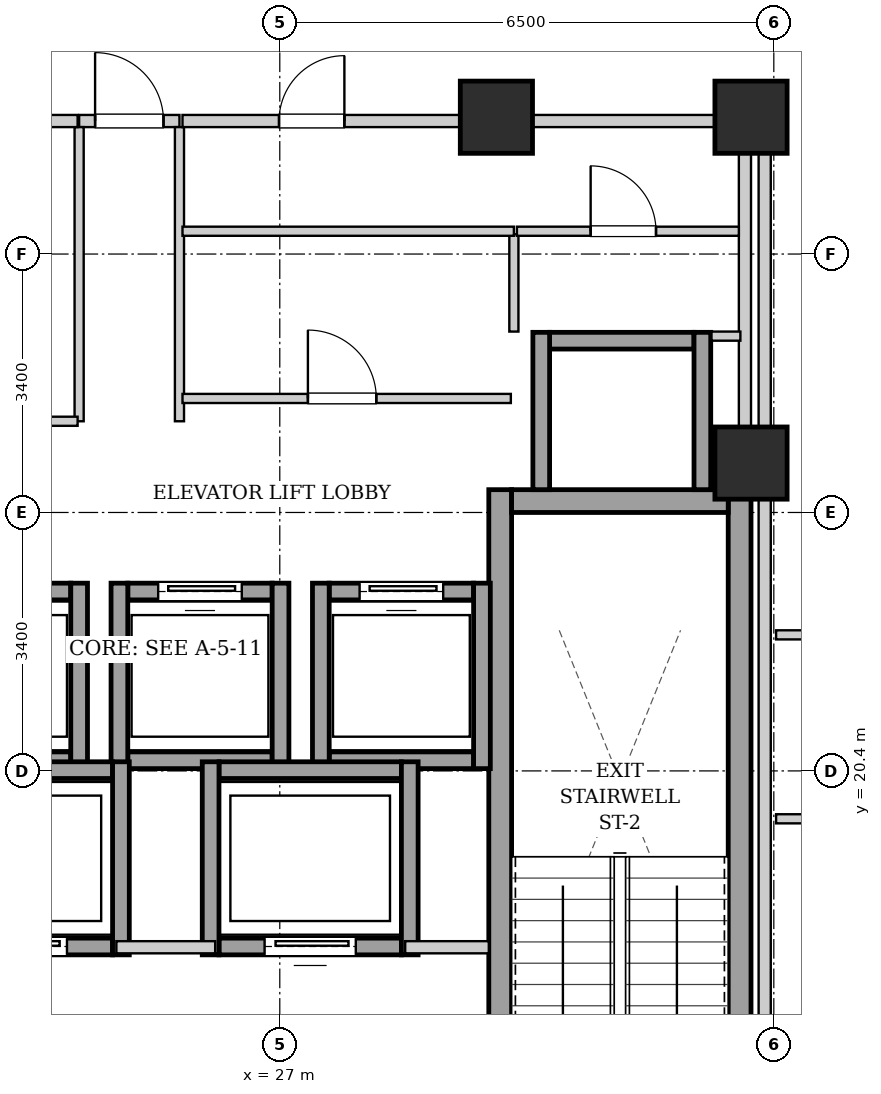
"""IFC4 building model, lengths in metres.
Left out: names, types, materials, properties, quantities, classifications, styles, units other than length and angle.
Written with IfcOpenShell. Run it as: python <this file> out.ifc"""

import sys

from ifc_helpers import new_model, si_unit, direction, frame, frame_2d, origin, origin_2d, place, context, subcontext, project, spatial, rectangle, extrude, element, fill, save


model = new_model("IFC4")
c1 = context("Model", 3, precision=1e-05, world=origin(), true_north=direction((0.0, 1.0)))
c2 = subcontext(c1, "Body", "Model", "MODEL_VIEW")
j1 = project(units=[si_unit("LENGTHUNIT", "METRE"), si_unit("PLANEANGLEUNIT", "RADIAN")], contexts=[c1])
p1 = place(None, origin())
s1 = spatial("IfcSite", under=j1, at=p1, CompositionType="ELEMENT")
p2 = place(p1, origin())
s2 = spatial("IfcBuilding", under=s1, at=p2, CompositionType="ELEMENT")
p3 = place(p2, frame((0.0, 0.0, 156.9)))
s3 = spatial("IfcBuildingStorey", under=s2, at=p3, CompositionType="ELEMENT", Elevation=156.9)
for number, where, z_axis, x_axis in (
    (1, (29.85, 29.0, 0.0), (0.0, 0.0, 1.0), (1.0, 0.0, 0.0)),
    (2, (33.2, 29.0, 0.0), (0.0, 0.0, 1.0), (1.0, 0.0, 0.0)),
    (3, (33.2, 24.45, 0.0), (0.0, 0.0, 1.0), (1.0, 0.0, 0.0)),
):
    element("IfcColumn", number, at=place(p3, frame(where, z_axis=z_axis, x_axis=x_axis)), inside=s3, PredefinedType="COLUMN", context=c2, shape_type="SweptSolid", body=[
        extrude(rectangle(XDim=0.95, YDim=0.95, at=origin_2d()), origin(), (0.0, 0.0, 1.0), 3.25),
    ])
for number, where, z_axis, x_axis in (
    (4, (29.9, 15.1, 0.0), (0.0, 0.0, 1.0), (0.0, 1.0, 0.0)),
    (5, (33.05, 15.1, 0.0), (0.0, 0.0, 1.0), (0.0, 1.0, 0.0)),
):
    element("IfcWall", number, at=place(p3, frame(where, z_axis=z_axis, x_axis=x_axis)), inside=s3, PredefinedType="SHEAR", context=c2, shape_type="SweptSolid", body=[
        extrude(rectangle(XDim=9.0, YDim=0.3, at=frame_2d((4.5, 0.0))), origin(), (0.0, 0.0, 1.0), 2.99),
    ])
p4 = place(p3, frame((30.05, 23.95, 0.0), z_axis=(0.0, 0.0, 1.0), x_axis=(1.0, 0.0, 0.0)))
e6 = element("IfcWall", 6, at=p4, inside=s3, PredefinedType="SHEAR", context=c2, shape_type="SweptSolid", body=[
    extrude(rectangle(XDim=2.85, YDim=0.3, at=frame_2d((1.425, 0.0))), origin(), (0.0, 0.0, 1.0), 2.99),
])
p5 = place(p3, frame((22.35, 20.54, 0.0), z_axis=(0.0, 0.0, 1.0), x_axis=(1.0, 0.0, 0.0)))
e7 = element("IfcWall", 7, at=p5, inside=s3, PredefinedType="SHEAR", context=c2, shape_type="SweptSolid", body=[
    extrude(rectangle(XDim=1.9, YDim=0.22, at=frame_2d((0.95, 0.0))), origin(), (0.0, 0.0, 1.0), 2.99),
])
p6 = place(p3, frame((22.35, 22.76, 0.0), z_axis=(0.0, 0.0, 1.0), x_axis=(1.0, 0.0, 0.0)))
e8 = element("IfcWall", 8, at=p6, inside=s3, PredefinedType="SHEAR", context=c2, shape_type="SweptSolid", body=[
    extrude(rectangle(XDim=1.9, YDim=0.22, at=frame_2d((0.95, 0.0))), origin(), (0.0, 0.0, 1.0), 2.99),
])
p7 = place(p6, frame((0.4, 0.0, 0.0)))
e9 = element("IfcOpeningElement", 9, at=p7, cuts=e8, PredefinedType="OPENING", context=c2, shape_type="SweptSolid", body=[
    extrude(rectangle(XDim=1.1, YDim=2.15, at=frame_2d((0.55, 1.075))), frame((0.0, 0.12, 0.0), z_axis=(0.0, -1.0, 0.0), x_axis=(1.0, 0.0, 0.0)), (0.0, 0.0, 1.0), 0.24),
])
p8 = place(p3, frame((24.36, 20.43, 0.0), z_axis=(0.0, 0.0, 1.0), x_axis=(0.0, 1.0, 0.0)))
e10 = element("IfcWall", 10, at=p8, inside=s3, PredefinedType="SHEAR", context=c2, shape_type="SweptSolid", body=[
    extrude(rectangle(XDim=2.44, YDim=0.22, at=frame_2d((1.22, 0.0))), origin(), (0.0, 0.0, 1.0), 2.99),
])
p9 = place(p3, frame((25.0, 20.54, 0.0), z_axis=(0.0, 0.0, 1.0), x_axis=(1.0, 0.0, 0.0)))
e11 = element("IfcWall", 11, at=p9, inside=s3, PredefinedType="SHEAR", context=c2, shape_type="SweptSolid", body=[
    extrude(rectangle(XDim=1.9, YDim=0.22, at=frame_2d((0.95, 0.0))), origin(), (0.0, 0.0, 1.0), 2.99),
])
p10 = place(p3, frame((25.0, 22.76, 0.0), z_axis=(0.0, 0.0, 1.0), x_axis=(1.0, 0.0, 0.0)))
e12 = element("IfcWall", 12, at=p10, inside=s3, PredefinedType="SHEAR", context=c2, shape_type="SweptSolid", body=[
    extrude(rectangle(XDim=1.9, YDim=0.22, at=frame_2d((0.95, 0.0))), origin(), (0.0, 0.0, 1.0), 2.99),
])
p11 = place(p10, frame((0.4, 0.0, 0.0)))
e13 = element("IfcOpeningElement", 13, at=p11, cuts=e12, PredefinedType="OPENING", context=c2, shape_type="SweptSolid", body=[
    extrude(rectangle(XDim=1.1, YDim=2.15, at=frame_2d((0.55, 1.075))), frame((0.0, 0.12, 0.0), z_axis=(0.0, -1.0, 0.0), x_axis=(1.0, 0.0, 0.0)), (0.0, 0.0, 1.0), 0.24),
])
for number, where, z_axis, x_axis in (
    (14, (24.89, 20.43, 0.0), (0.0, 0.0, 1.0), (0.0, 1.0, 0.0)),
    (15, (27.01, 20.43, 0.0), (0.0, 0.0, 1.0), (0.0, 1.0, 0.0)),
):
    element("IfcWall", number, at=place(p3, frame(where, z_axis=z_axis, x_axis=x_axis)), inside=s3, PredefinedType="SHEAR", context=c2, shape_type="SweptSolid", body=[
        extrude(rectangle(XDim=2.44, YDim=0.22, at=frame_2d((1.22, 0.0))), origin(), (0.0, 0.0, 1.0), 2.99),
    ])
p12 = place(p3, frame((27.65, 20.54, 0.0), z_axis=(0.0, 0.0, 1.0), x_axis=(1.0, 0.0, 0.0)))
e16 = element("IfcWall", 16, at=p12, inside=s3, PredefinedType="SHEAR", context=c2, shape_type="SweptSolid", body=[
    extrude(rectangle(XDim=1.9, YDim=0.22, at=frame_2d((0.95, 0.0))), origin(), (0.0, 0.0, 1.0), 2.99),
])
p13 = place(p3, frame((27.65, 22.76, 0.0), z_axis=(0.0, 0.0, 1.0), x_axis=(1.0, 0.0, 0.0)))
e17 = element("IfcWall", 17, at=p13, inside=s3, PredefinedType="SHEAR", context=c2, shape_type="SweptSolid", body=[
    extrude(rectangle(XDim=1.9, YDim=0.22, at=frame_2d((0.95, 0.0))), origin(), (0.0, 0.0, 1.0), 2.99),
])
p14 = place(p13, frame((0.4, 0.0, 0.0)))
e18 = element("IfcOpeningElement", 18, at=p14, cuts=e17, PredefinedType="OPENING", context=c2, shape_type="SweptSolid", body=[
    extrude(rectangle(XDim=1.1, YDim=2.15, at=frame_2d((0.55, 1.075))), frame((0.0, 0.12, 0.0), z_axis=(0.0, -1.0, 0.0), x_axis=(1.0, 0.0, 0.0)), (0.0, 0.0, 1.0), 0.24),
])
for number, where, z_axis, x_axis in (
    (19, (27.54, 20.43, 0.0), (0.0, 0.0, 1.0), (0.0, 1.0, 0.0)),
    (20, (29.66, 20.43, 0.0), (0.0, 0.0, 1.0), (0.0, 1.0, 0.0)),
):
    element("IfcWall", number, at=place(p3, frame(where, z_axis=z_axis, x_axis=x_axis)), inside=s3, PredefinedType="SHEAR", context=c2, shape_type="SweptSolid", body=[
        extrude(rectangle(XDim=2.44, YDim=0.22, at=frame_2d((1.22, 0.0))), origin(), (0.0, 0.0, 1.0), 2.99),
    ])
p15 = place(p3, frame((30.55, 26.06, 0.0), z_axis=(0.0, 0.0, 1.0), x_axis=(1.0, 0.0, 0.0)))
e21 = element("IfcWall", 21, at=p15, inside=s3, PredefinedType="SHEAR", context=c2, shape_type="SweptSolid", body=[
    extrude(rectangle(XDim=1.9, YDim=0.22, at=frame_2d((0.95, 0.0))), origin(), (0.0, 0.0, 1.0), 2.99),
])
for number, where, z_axis, x_axis in (
    (22, (30.44, 24.1, 0.0), (0.0, 0.0, 1.0), (0.0, 1.0, 0.0)),
    (23, (32.56, 24.1, 0.0), (0.0, 0.0, 1.0), (0.0, 1.0, 0.0)),
):
    element("IfcWall", number, at=place(p3, frame(where, z_axis=z_axis, x_axis=x_axis)), inside=s3, PredefinedType="SHEAR", context=c2, shape_type="SweptSolid", body=[
        extrude(rectangle(XDim=2.07, YDim=0.22, at=frame_2d((1.035, 0.0))), origin(), (0.0, 0.0, 1.0), 2.99),
    ])
p16 = place(p3, frame((22.4, 18.09, 0.0), z_axis=(0.0, 0.0, 1.0), x_axis=(1.0, 0.0, 0.0)))
e24 = element("IfcWall", 24, at=p16, inside=s3, PredefinedType="SHEAR", context=c2, shape_type="SweptSolid", body=[
    extrude(rectangle(XDim=2.4, YDim=0.22, at=frame_2d((1.2, 0.0))), origin(), (0.0, 0.0, 1.0), 2.99),
])
p17 = place(p16, frame((0.6, 0.0, 0.0)))
e25 = element("IfcOpeningElement", 25, at=p17, cuts=e24, PredefinedType="OPENING", context=c2, shape_type="SweptSolid", body=[
    extrude(rectangle(XDim=1.2, YDim=2.15, at=frame_2d((0.6, 1.075))), frame((0.0, 0.12, 0.0), z_axis=(0.0, -1.0, 0.0), x_axis=(1.0, 0.0, 0.0)), (0.0, 0.0, 1.0), 0.24),
])
p18 = place(p3, frame((22.4, 20.41, 0.0), z_axis=(0.0, 0.0, 1.0), x_axis=(1.0, 0.0, 0.0)))
e26 = element("IfcWall", 26, at=p18, inside=s3, PredefinedType="SHEAR", context=c2, shape_type="SweptSolid", body=[
    extrude(rectangle(XDim=2.4, YDim=0.22, at=frame_2d((1.2, 0.0))), origin(), (0.0, 0.0, 1.0), 2.99),
])
p19 = place(p3, frame((24.91, 17.98, 0.0), z_axis=(0.0, 0.0, 1.0), x_axis=(0.0, 1.0, 0.0)))
e27 = element("IfcWall", 27, at=p19, inside=s3, PredefinedType="SHEAR", context=c2, shape_type="SweptSolid", body=[
    extrude(rectangle(XDim=2.54, YDim=0.22, at=frame_2d((1.27, 0.0))), origin(), (0.0, 0.0, 1.0), 2.99),
])
p20 = place(p3, frame((26.2, 18.09, 0.0), z_axis=(0.0, 0.0, 1.0), x_axis=(1.0, 0.0, 0.0)))
e28 = element("IfcWall", 28, at=p20, inside=s3, PredefinedType="SHEAR", context=c2, shape_type="SweptSolid", body=[
    extrude(rectangle(XDim=2.4, YDim=0.22, at=frame_2d((1.2, 0.0))), origin(), (0.0, 0.0, 1.0), 2.99),
])
p21 = place(p20, frame((0.6, 0.0, 0.0)))
e29 = element("IfcOpeningElement", 29, at=p21, cuts=e28, PredefinedType="OPENING", context=c2, shape_type="SweptSolid", body=[
    extrude(rectangle(XDim=1.2, YDim=2.15, at=frame_2d((0.6, 1.075))), frame((0.0, 0.12, 0.0), z_axis=(0.0, -1.0, 0.0), x_axis=(1.0, 0.0, 0.0)), (0.0, 0.0, 1.0), 0.24),
])
p22 = place(p3, frame((26.2, 20.41, 0.0), z_axis=(0.0, 0.0, 1.0), x_axis=(1.0, 0.0, 0.0)))
e30 = element("IfcWall", 30, at=p22, inside=s3, PredefinedType="SHEAR", context=c2, shape_type="SweptSolid", body=[
    extrude(rectangle(XDim=2.4, YDim=0.22, at=frame_2d((1.2, 0.0))), origin(), (0.0, 0.0, 1.0), 2.99),
])
for number, where, z_axis, x_axis in (
    (31, (26.09, 17.98, 0.0), (0.0, 0.0, 1.0), (0.0, 1.0, 0.0)),
    (32, (28.71, 17.98, 0.0), (0.0, 0.0, 1.0), (0.0, 1.0, 0.0)),
):
    element("IfcWall", number, at=place(p3, frame(where, z_axis=z_axis, x_axis=x_axis)), inside=s3, PredefinedType="SHEAR", context=c2, shape_type="SweptSolid", body=[
        extrude(rectangle(XDim=2.54, YDim=0.22, at=frame_2d((1.27, 0.0))), origin(), (0.0, 0.0, 1.0), 2.99),
    ])
p23 = place(p3, frame((24.85, 18.08, 0.0), z_axis=(0.0, 0.0, 1.0), x_axis=(1.0, 0.0, 0.0)))
e33 = element("IfcWall", 33, at=p23, inside=s3, PredefinedType="PARTITIONING", context=c2, shape_type="SweptSolid", body=[
    extrude(rectangle(XDim=1.3, YDim=0.16, at=frame_2d((0.65, 0.0))), origin(), (0.0, 0.0, 1.0), 2.99),
])
p24 = place(p3, frame((28.65, 18.08, 0.0), z_axis=(0.0, 0.0, 1.0), x_axis=(1.0, 0.0, 0.0)))
e34 = element("IfcWall", 34, at=p24, inside=s3, PredefinedType="PARTITIONING", context=c2, shape_type="SweptSolid", body=[
    extrude(rectangle(XDim=1.1, YDim=0.16, at=frame_2d((0.55, 0.0))), origin(), (0.0, 0.0, 1.0), 2.99),
])
p25 = place(p3, frame((33.12, 24.12, 0.0), z_axis=(0.0, 0.0, 1.0), x_axis=(0.0, 1.0, 0.0)))
e35 = element("IfcWall", 35, at=p25, inside=s3, PredefinedType="PARTITIONING", context=c2, shape_type="SweptSolid", body=[
    extrude(rectangle(XDim=4.76, YDim=0.16, at=frame_2d((2.38, 0.0))), origin(), (0.0, 0.0, 1.0), 2.325),
])
p26 = place(p3, frame((24.36, 28.95, 0.0), z_axis=(0.0, 0.0, 1.0), x_axis=(1.0, 0.0, 0.0)))
e36 = element("IfcWall", 36, at=p26, inside=s3, PredefinedType="PARTITIONING", context=c2, shape_type="SweptSolid", body=[
    extrude(rectangle(XDim=1.32, YDim=0.16, at=frame_2d((0.66, 0.0))), origin(), (0.0, 0.0, 1.0), 2.442),
])
p27 = place(p26, frame((0.21, 0.0, 0.0)))
e37 = element("IfcOpeningElement", 37, at=p27, cuts=e36, PredefinedType="OPENING", context=c2, shape_type="SweptSolid", body=[
    extrude(rectangle(XDim=0.9, YDim=2.05, at=frame_2d((0.45, 1.025))), frame((0.0, 0.09, 0.0), z_axis=(0.0, -1.0, 0.0), x_axis=(1.0, 0.0, 0.0)), (0.0, 0.0, 1.0), 0.18),
])
for number, where, z_axis, x_axis in (
    (38, (24.36, 25.0, 0.0), (0.0, 0.0, 1.0), (0.0, 1.0, 0.0)),
    (39, (25.68, 25.0, 0.0), (0.0, 0.0, 1.0), (0.0, 1.0, 0.0)),
):
    element("IfcWall", number, at=place(p3, frame(where, z_axis=z_axis, x_axis=x_axis)), inside=s3, PredefinedType="PARTITIONING", context=c2, shape_type="SweptSolid", body=[
        extrude(rectangle(XDim=3.87, YDim=0.12, at=frame_2d((1.935, 0.0))), origin(), (0.0, 0.0, 1.0), 2.99),
    ])
p28 = place(p3, frame((30.08, 26.18, 0.0), z_axis=(0.0, 0.0, 1.0), x_axis=(0.0, 1.0, 0.0)))
e40 = element("IfcWall", 40, at=p28, inside=s3, PredefinedType="PARTITIONING", context=c2, shape_type="SweptSolid", body=[
    extrude(rectangle(XDim=1.28, YDim=0.12, at=frame_2d((0.64, 0.0))), origin(), (0.0, 0.0, 1.0), 2.99),
])
p29 = place(p3, frame((32.68, 26.12, 0.0), z_axis=(0.0, 0.0, 1.0), x_axis=(1.0, 0.0, 0.0)))
e41 = element("IfcWall", 41, at=p29, inside=s3, PredefinedType="PARTITIONING", context=c2, shape_type="SweptSolid", body=[
    extrude(rectangle(XDim=0.38, YDim=0.12, at=frame_2d((0.19, 0.0))), origin(), (0.0, 0.0, 1.0), 2.99),
])
p30 = place(p3, frame((30.12, 27.5, 0.0), z_axis=(0.0, 0.0, 1.0), x_axis=(1.0, 0.0, 0.0)))
e42 = element("IfcWall", 42, at=p30, inside=s3, PredefinedType="PARTITIONING", context=c2, shape_type="SweptSolid", body=[
    extrude(rectangle(XDim=2.92, YDim=0.12, at=frame_2d((1.46, 0.0))), origin(), (0.0, 0.0, 1.0), 2.99),
])
p31 = place(p30, frame((0.97, 0.0, 0.0)))
e43 = element("IfcOpeningElement", 43, at=p31, cuts=e42, PredefinedType="OPENING", context=c2, shape_type="SweptSolid", body=[
    extrude(rectangle(XDim=0.86, YDim=2.05, at=frame_2d((0.43, 1.025))), frame((0.0, 0.07, 0.0), z_axis=(0.0, -1.0, 0.0), x_axis=(1.0, 0.0, 0.0)), (0.0, 0.0, 1.0), 0.14),
])
p32 = place(p3, frame((22.3, 25.0, 0.0), z_axis=(0.0, 0.0, 1.0), x_axis=(1.0, 0.0, 0.0)))
e44 = element("IfcWall", 44, at=p32, inside=s3, PredefinedType="PARTITIONING", context=c2, shape_type="SweptSolid", body=[
    extrude(rectangle(XDim=2.04, YDim=0.12, at=frame_2d((1.02, 0.0))), origin(), (0.0, 0.0, 1.0), 2.99),
])
p33 = place(p3, frame((22.28, 28.95, 0.0), z_axis=(0.0, 0.0, 1.0), x_axis=(1.0, 0.0, 0.0)))
e45 = element("IfcWall", 45, at=p33, inside=s3, PredefinedType="PARTITIONING", context=c2, shape_type="SweptSolid", body=[
    extrude(rectangle(XDim=2.06, YDim=0.16, at=frame_2d((1.03, 0.0))), origin(), (0.0, 0.0, 1.0), 2.442),
])
p34 = place(p33, frame((0.62, 0.0, 0.0)))
e46 = element("IfcOpeningElement", 46, at=p34, cuts=e45, PredefinedType="OPENING", context=c2, shape_type="SweptSolid", body=[
    extrude(rectangle(XDim=0.86, YDim=2.05, at=frame_2d((0.43, 1.025))), frame((0.0, 0.09, 0.0), z_axis=(0.0, -1.0, 0.0), x_axis=(1.0, 0.0, 0.0)), (0.0, 0.0, 1.0), 0.18),
])
p35 = place(p3, frame((25.72, 27.5, 0.0), z_axis=(0.0, 0.0, 1.0), x_axis=(1.0, 0.0, 0.0)))
e47 = element("IfcWall", 47, at=p35, inside=s3, PredefinedType="PARTITIONING", context=c2, shape_type="SweptSolid", body=[
    extrude(rectangle(XDim=4.36, YDim=0.12, at=frame_2d((2.18, 0.0))), origin(), (0.0, 0.0, 1.0), 2.99),
])
p36 = place(p3, frame((25.72, 25.3, 0.0), z_axis=(0.0, 0.0, 1.0), x_axis=(1.0, 0.0, 0.0)))
e48 = element("IfcWall", 48, at=p36, inside=s3, PredefinedType="PARTITIONING", context=c2, shape_type="SweptSolid", body=[
    extrude(rectangle(XDim=4.32, YDim=0.12, at=frame_2d((2.16, 0.0))), origin(), (0.0, 0.0, 1.0), 2.99),
])
p37 = place(p36, frame((1.65, 0.0, 0.0)))
e49 = element("IfcOpeningElement", 49, at=p37, cuts=e48, PredefinedType="OPENING", context=c2, shape_type="SweptSolid", body=[
    extrude(rectangle(XDim=0.9, YDim=2.05, at=frame_2d((0.45, 1.025))), frame((0.0, 0.07, 0.0), z_axis=(0.0, -1.0, 0.0), x_axis=(1.0, 0.0, 0.0)), (0.0, 0.0, 1.0), 0.14),
])
p38 = place(p3, frame((25.72, 28.95, 0.0), z_axis=(0.0, 0.0, 1.0), x_axis=(1.0, 0.0, 0.0)))
e50 = element("IfcWall", 50, at=p38, inside=s3, PredefinedType="PARTITIONING", context=c2, shape_type="SweptSolid", body=[
    extrude(rectangle(XDim=7.32, YDim=0.16, at=frame_2d((3.66, 0.0))), origin(), (0.0, 0.0, 1.0), 2.442),
])
p39 = place(p38, frame((1.27, 0.0, 0.0)))
e51 = element("IfcOpeningElement", 51, at=p39, cuts=e50, PredefinedType="OPENING", context=c2, shape_type="SweptSolid", body=[
    extrude(rectangle(XDim=0.86, YDim=2.05, at=frame_2d((0.43, 1.025))), frame((0.0, 0.09, 0.0), z_axis=(0.0, -1.0, 0.0), x_axis=(1.0, 0.0, 0.0)), (0.0, 0.0, 1.0), 0.18),
])
p40 = place(p3, frame((33.53, 22.19, 0.0), z_axis=(0.0, 0.0, 1.0), x_axis=(1.0, 0.0, 0.0)))
e52 = element("IfcWall", 52, at=p40, inside=s3, PredefinedType="PARTITIONING", context=c2, shape_type="SweptSolid", body=[
    extrude(rectangle(XDim=2.45, YDim=0.12, at=frame_2d((1.225, 0.0))), origin(), (0.0, 0.0, 1.0), 2.99),
])
p41 = place(p3, frame((33.53, 19.77, 0.0), z_axis=(0.0, 0.0, 1.0), x_axis=(1.0, 0.0, 0.0)))
e53 = element("IfcWall", 53, at=p41, inside=s3, PredefinedType="PARTITIONING", context=c2, shape_type="SweptSolid", body=[
    extrude(rectangle(XDim=2.45, YDim=0.12, at=frame_2d((1.225, 0.0))), origin(), (0.0, 0.0, 1.0), 2.99),
])
p42 = place(p41, frame((0.795, 0.0, 0.0)))
e54 = element("IfcOpeningElement", 54, at=p42, cuts=e53, PredefinedType="OPENING", context=c2, shape_type="SweptSolid", body=[
    extrude(rectangle(XDim=0.86, YDim=2.05, at=frame_2d((0.43, 1.025))), frame((0.0, 0.07, 0.0), z_axis=(0.0, -1.0, 0.0), x_axis=(1.0, 0.0, 0.0)), (0.0, 0.0, 1.0), 0.14),
])
p43 = place(p3, frame((33.38, 15.02, 0.0), z_axis=(0.0, 0.0, 1.0), x_axis=(0.0, 1.0, 0.0)))
e55 = element("IfcWall", 55, at=p43, inside=s3, PredefinedType="PARTITIONING", context=c2, shape_type="SweptSolid", body=[
    extrude(rectangle(XDim=13.98, YDim=0.16, at=frame_2d((6.99, 0.0))), origin(), (0.0, 0.0, 1.0), 2.325),
])
p44 = place(p11, origin())
e56 = element("IfcDoor", 56, at=p44, inside=s3, OperationType="SLIDING_TO_LEFT", PredefinedType="DOOR", context=c2, shape_type="SweptSolid", body=[
    extrude(rectangle(XDim=1.1, YDim=2.15, at=frame_2d((0.55, 1.075))), frame((0.0, 0.025, 0.0), z_axis=(0.0, -1.0, 0.0), x_axis=(1.0, 0.0, 0.0)), (0.0, 0.0, 1.0), 0.05),
])
fill(e13, e56)
p45 = place(p14, origin())
e57 = element("IfcDoor", 57, at=p45, inside=s3, OperationType="SLIDING_TO_LEFT", PredefinedType="DOOR", context=c2, shape_type="SweptSolid", body=[
    extrude(rectangle(XDim=1.1, YDim=2.15, at=frame_2d((0.55, 1.075))), frame((0.0, 0.025, 0.0), z_axis=(0.0, -1.0, 0.0), x_axis=(1.0, 0.0, 0.0)), (0.0, 0.0, 1.0), 0.05),
])
fill(e18, e57)
p46 = place(p17, origin())
e58 = element("IfcDoor", 58, at=p46, inside=s3, OperationType="SLIDING_TO_LEFT", PredefinedType="DOOR", context=c2, shape_type="SweptSolid", body=[
    extrude(rectangle(XDim=1.2, YDim=2.15, at=frame_2d((0.6, 1.075))), frame((0.0, 0.025, 0.0), z_axis=(0.0, -1.0, 0.0), x_axis=(1.0, 0.0, 0.0)), (0.0, 0.0, 1.0), 0.05),
])
fill(e25, e58)
p47 = place(p21, origin())
e59 = element("IfcDoor", 59, at=p47, inside=s3, OperationType="SLIDING_TO_LEFT", PredefinedType="DOOR", context=c2, shape_type="SweptSolid", body=[
    extrude(rectangle(XDim=1.2, YDim=2.15, at=frame_2d((0.6, 1.075))), frame((0.0, 0.025, 0.0), z_axis=(0.0, -1.0, 0.0), x_axis=(1.0, 0.0, 0.0)), (0.0, 0.0, 1.0), 0.05),
])
fill(e29, e59)
p48 = place(p27, origin())
e60 = element("IfcDoor", 60, at=p48, inside=s3, OperationType="SINGLE_SWING_LEFT", PredefinedType="DOOR", context=c2, shape_type="SweptSolid", body=[
    extrude(rectangle(XDim=0.9, YDim=2.05, at=frame_2d((0.45, 1.025))), frame((0.0, 0.025, 0.0), z_axis=(0.0, -1.0, 0.0), x_axis=(1.0, 0.0, 0.0)), (0.0, 0.0, 1.0), 0.05),
])
fill(e37, e60)
p49 = place(p31, origin())
e61 = element("IfcDoor", 61, at=p49, inside=s3, OperationType="SINGLE_SWING_LEFT", PredefinedType="DOOR", context=c2, shape_type="SweptSolid", body=[
    extrude(rectangle(XDim=0.86, YDim=2.05, at=frame_2d((0.43, 1.025))), frame((0.0, 0.025, 0.0), z_axis=(0.0, -1.0, 0.0), x_axis=(1.0, 0.0, 0.0)), (0.0, 0.0, 1.0), 0.05),
])
fill(e43, e61)
p50 = place(p37, origin())
e62 = element("IfcDoor", 62, at=p50, inside=s3, OperationType="SINGLE_SWING_LEFT", PredefinedType="DOOR", context=c2, shape_type="SweptSolid", body=[
    extrude(rectangle(XDim=0.9, YDim=2.05, at=frame_2d((0.45, 1.025))), frame((0.0, 0.025, 0.0), z_axis=(0.0, -1.0, 0.0), x_axis=(1.0, 0.0, 0.0)), (0.0, 0.0, 1.0), 0.05),
])
fill(e49, e62)
p51 = place(p39, origin())
e63 = element("IfcDoor", 63, at=p51, inside=s3, OperationType="SINGLE_SWING_RIGHT", PredefinedType="DOOR", context=c2, shape_type="SweptSolid", body=[
    extrude(rectangle(XDim=0.86, YDim=2.05, at=frame_2d((0.43, 1.025))), frame((0.0, 0.025, 0.0), z_axis=(0.0, -1.0, 0.0), x_axis=(1.0, 0.0, 0.0)), (0.0, 0.0, 1.0), 0.05),
])
fill(e51, e63)
save(model, sys.argv[1])
